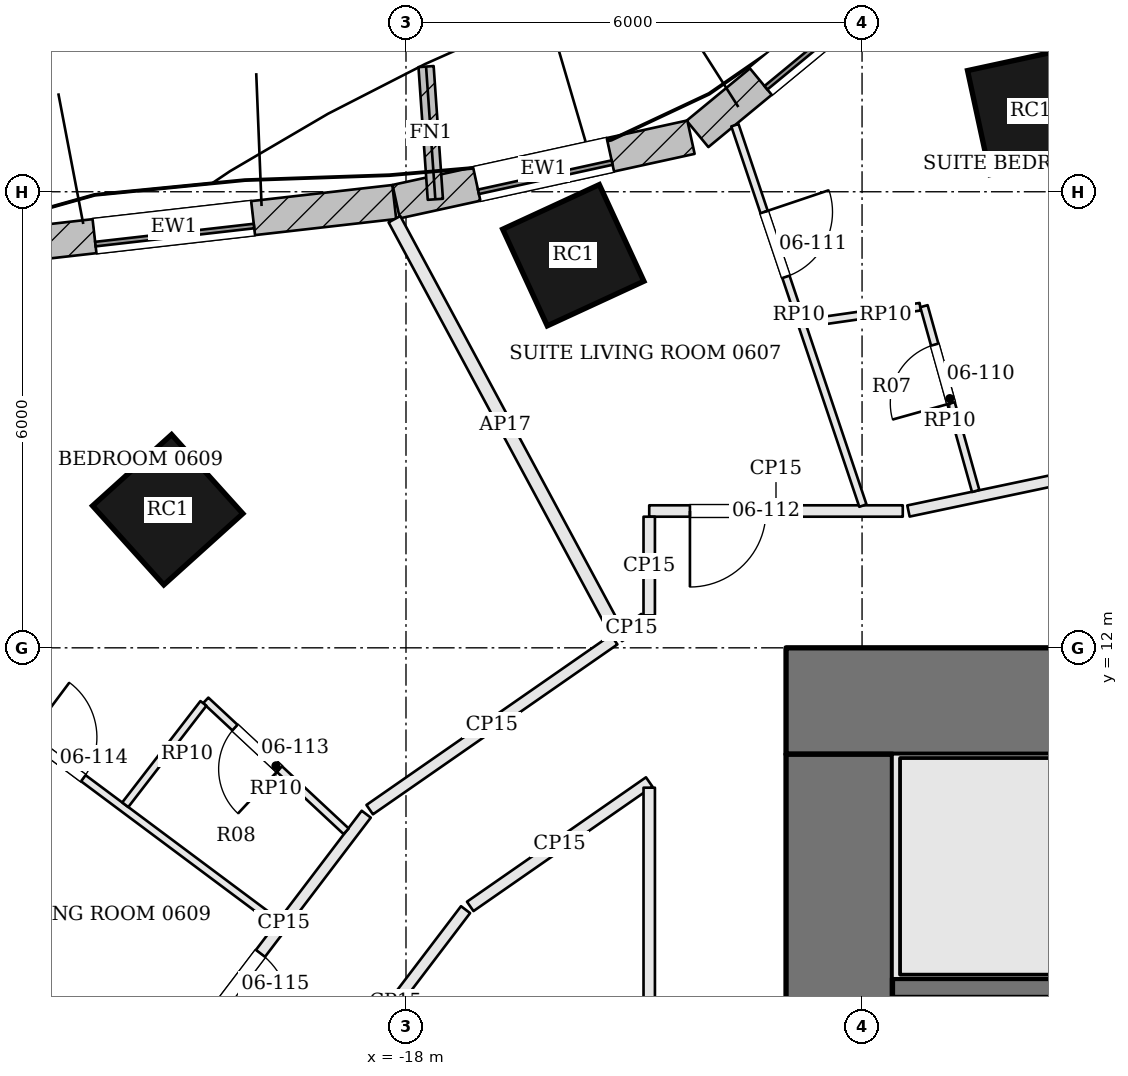
"""IFC4 building model, lengths in metres.
Left out: names, types, materials, properties, quantities, classifications, styles, units other than length and angle.
Written with IfcOpenShell. Run it as: python <this file> out.ifc"""

import sys

from ifc_helpers import new_model, si_unit, direction, frame, frame_2d, origin, origin_2d, place, context, subcontext, project, spatial, rectangle, extrude, element, fill, save


model = new_model("IFC4")
c1 = context("Model", 3, precision=1e-05, world=origin(), true_north=direction((0.0, 1.0)))
c2 = subcontext(c1, "Body", "Model", "MODEL_VIEW")
j1 = project(units=[si_unit("LENGTHUNIT", "METRE"), si_unit("PLANEANGLEUNIT", "RADIAN")], contexts=[c1])
p1 = place(None, origin())
s1 = spatial("IfcSite", under=j1, at=p1, CompositionType="ELEMENT")
p2 = place(p1, origin())
s2 = spatial("IfcBuilding", under=s1, at=p2, CompositionType="ELEMENT")
p3 = place(p2, frame((0.0, 0.0, 37.5)))
s3 = spatial("IfcBuildingStorey", under=s2, at=p3, CompositionType="ELEMENT", Elevation=37.5)
p4 = place(p3, frame((-13.0, 11.3, 0.0), z_axis=(0.0, 0.0, 1.0), x_axis=(1.0, 0.0, 0.0)))
e1 = element("IfcWall", 1, at=p4, inside=s3, PredefinedType="SHEAR", context=c2, shape_type="SweptSolid", body=[
    extrude(rectangle(XDim=26.0, YDim=1.4, at=frame_2d((13.0, 0.0))), origin(), (0.0, 0.0, 1.0), 3.6),
])
p5 = place(p4, frame((9.225, 0.0, 0.0)))
e2 = element("IfcOpeningElement", 2, at=p5, cuts=e1, PredefinedType="OPENING", context=c2, shape_type="SweptSolid", body=[
    extrude(rectangle(XDim=1.0, YDim=2.1, at=frame_2d((0.5, 1.05))), frame((0.0, 0.71, 0.0), z_axis=(0.0, -1.0, 0.0), x_axis=(1.0, 0.0, 0.0)), (0.0, 0.0, 1.0), 1.42),
])
p6 = place(p4, frame((11.825, 0.0, 0.0)))
e3 = element("IfcOpeningElement", 3, at=p6, cuts=e1, PredefinedType="OPENING", context=c2, shape_type="SweptSolid", body=[
    extrude(rectangle(XDim=0.7, YDim=2.1, at=frame_2d((0.35, 1.05))), frame((0.0, 0.71, 0.0), z_axis=(0.0, -1.0, 0.0), x_axis=(1.0, 0.0, 0.0)), (0.0, 0.0, 1.0), 1.42),
])
p7 = place(p4, frame((13.725, 0.0, 0.0)))
e4 = element("IfcOpeningElement", 4, at=p7, cuts=e1, PredefinedType="OPENING", context=c2, shape_type="SweptSolid", body=[
    extrude(rectangle(XDim=1.0, YDim=2.1, at=frame_2d((0.5, 1.05))), frame((0.0, 0.71, 0.0), z_axis=(0.0, -1.0, 0.0), x_axis=(1.0, 0.0, 0.0)), (0.0, 0.0, 1.0), 1.42),
])
p8 = place(p4, frame((16.225, 0.0, 0.0)))
e5 = element("IfcOpeningElement", 5, at=p8, cuts=e1, PredefinedType="OPENING", context=c2, shape_type="SweptSolid", body=[
    extrude(rectangle(XDim=0.9, YDim=2.1, at=frame_2d((0.45, 1.05))), frame((0.0, 0.71, 0.0), z_axis=(0.0, -1.0, 0.0), x_axis=(1.0, 0.0, 0.0)), (0.0, 0.0, 1.0), 1.42),
])
p9 = place(p3, frame((-12.3, -1.6, 0.0), z_axis=(0.0, 0.0, 1.0), x_axis=(0.0, 1.0, 0.0)))
e6 = element("IfcWall", 6, at=p9, inside=s3, PredefinedType="SHEAR", context=c2, shape_type="SweptSolid", body=[
    extrude(rectangle(XDim=12.2, YDim=1.4, at=frame_2d((6.1, 0.0))), origin(), (0.0, 0.0, 1.0), 3.6),
])
p10 = place(p9, frame((3.6, 0.0, 0.0)))
e7 = element("IfcOpeningElement", 7, at=p10, cuts=e6, PredefinedType="OPENING", context=c2, shape_type="SweptSolid", body=[
    extrude(rectangle(XDim=1.8, YDim=2.1, at=frame_2d((0.9, 1.05))), frame((0.0, 0.71, 0.0), z_axis=(0.0, -1.0, 0.0), x_axis=(1.0, 0.0, 0.0)), (0.0, 0.0, 1.0), 1.42),
])
for number, where, z_axis, x_axis in (
    (8, (-9.78, 19.058, 0.0), (0.0, 0.0, 1.0), (-0.977, -0.211, 0.0)),
    (9, (-15.799, 17.165, 0.0), (0.0, 0.0, 1.0), (-0.908, -0.419, 0.0)),
    (10, (-21.135, 13.817, 0.0), (0.0, 0.0, 1.0), (-0.743, -0.67, 0.0)),
):
    element("IfcColumn", number, at=place(p3, frame(where, z_axis=z_axis, x_axis=x_axis)), inside=s3, PredefinedType="COLUMN", context=c2, shape_type="SweptSolid", body=[
        extrude(rectangle(XDim=1.4, YDim=1.4, at=origin_2d()), origin(), (0.0, 0.0, 1.0), 3.6),
    ])
p11 = place(p3, frame((-10.879, 21.473, 0.0), z_axis=(0.0, 0.0, 1.0), x_axis=(-0.77124668946, -0.636536365023, 0.0)))
e11 = element("IfcWall", 11, at=p11, inside=s3, PredefinedType="SOLIDWALL", context=c2, shape_type="SweptSolid", body=[
    extrude(rectangle(XDim=4.261, YDim=0.45, at=frame_2d((2.13, 0.0))), origin(), (0.0, 0.0, 1.0), 3.4),
])
p12 = place(p11, frame((1.08, 0.0, 0.9)))
e12 = element("IfcOpeningElement", 12, at=p12, cuts=e11, PredefinedType="OPENING", context=c2, shape_type="SweptSolid", body=[
    extrude(rectangle(XDim=2.1, YDim=2.0, at=frame_2d((1.05, 1.0))), frame((0.0, 0.235, 0.0), z_axis=(0.0, -1.0, 0.0), x_axis=(1.0, 0.0, 0.0)), (0.0, 0.0, 1.0), 0.47),
])
p13 = place(p3, frame((-14.251, 18.718, 0.0), z_axis=(0.0, 0.0, 1.0), x_axis=(-0.976903627618, -0.213680374267, 0.0)))
e13 = element("IfcWall", 13, at=p13, inside=s3, PredefinedType="SOLIDWALL", context=c2, shape_type="SweptSolid", body=[
    extrude(rectangle(XDim=3.97, YDim=0.45, at=frame_2d((1.985, 0.0))), origin(), (0.0, 0.0, 1.0), 3.4),
])
p14 = place(p13, frame((1.085, 0.0, 0.9)))
e14 = element("IfcOpeningElement", 14, at=p14, cuts=e13, PredefinedType="OPENING", context=c2, shape_type="SweptSolid", body=[
    extrude(rectangle(XDim=1.8, YDim=2.0, at=frame_2d((0.9, 1.0))), frame((0.0, 0.235, 0.0), z_axis=(0.0, -1.0, 0.0), x_axis=(1.0, 0.0, 0.0)), (0.0, 0.0, 1.0), 0.47),
])
p15 = place(p3, frame((-18.154, 17.865, 0.0), z_axis=(0.0, 0.0, 1.0), x_axis=(-0.993572909097, -0.113193967633, 0.0)))
e15 = element("IfcWall", 15, at=p15, inside=s3, PredefinedType="SOLIDWALL", context=c2, shape_type="SweptSolid", body=[
    extrude(rectangle(XDim=5.839, YDim=0.45, at=frame_2d((2.919, 0.0))), origin(), (0.0, 0.0, 1.0), 3.4),
])
p16 = place(p15, frame((1.869, 0.0, 0.9)))
e16 = element("IfcOpeningElement", 16, at=p16, cuts=e15, PredefinedType="OPENING", context=c2, shape_type="SweptSolid", body=[
    extrude(rectangle(XDim=2.1, YDim=2.0, at=frame_2d((1.05, 1.0))), frame((0.0, 0.235, 0.0), z_axis=(0.0, -1.0, 0.0), x_axis=(1.0, 0.0, 0.0)), (0.0, 0.0, 1.0), 0.47),
])
p17 = place(p3, frame((-17.614, 17.901, 0.0), z_axis=(0.0, 0.0, 1.0), x_axis=(-0.069750000204, 0.997564502913, 0.0)))
e17 = element("IfcWall", 17, at=p17, inside=s3, PredefinedType="SOLIDWALL", context=c2, shape_type="SweptSolid", body=[
    extrude(rectangle(XDim=1.75, YDim=0.2, at=frame_2d((0.875, 0.0))), origin(), (0.0, 0.0, 1.0), 3.4),
])
p18 = place(p3, frame((-11.6, 7.525, 0.0), z_axis=(0.0, 0.0, 1.0), x_axis=(1.0, 0.0, 0.0)))
e18 = element("IfcWall", 18, at=p18, inside=s3, PredefinedType="SOLIDWALL", context=c2, shape_type="SweptSolid", body=[
    extrude(rectangle(XDim=6.5, YDim=0.25, at=frame_2d((3.25, 0.0))), origin(), (0.0, 0.0, 1.0), 3.4),
])
p19 = place(p18, frame((5.2, 0.0, 0.0)))
e19 = element("IfcOpeningElement", 19, at=p19, cuts=e18, PredefinedType="OPENING", context=c2, shape_type="SweptSolid", body=[
    extrude(rectangle(XDim=1.2, YDim=2.1, at=frame_2d((0.6, 1.05))), frame((0.0, 0.135, 0.0), z_axis=(0.0, -1.0, 0.0), x_axis=(1.0, 0.0, 0.0)), (0.0, 0.0, 1.0), 0.27),
])
p20 = place(p3, frame((-6.55, 14.821, 0.0), z_axis=(0.0, 0.0, 1.0), x_axis=(-0.978464864562, -0.206413441465, 0.0)))
e20 = element("IfcWall", 20, at=p20, inside=s3, PredefinedType="PARTITIONING", context=c2, shape_type="SweptSolid", body=[
    extrude(rectangle(XDim=4.946, YDim=0.15, at=frame_2d((2.473, 0.0))), origin(), (0.0, 0.0, 1.0), 2.68),
])
p21 = place(p3, frame((-11.464, 13.8, 0.0), z_axis=(0.0, 0.0, 1.0), x_axis=(-1.0, 0.0, 0.0)))
e21 = element("IfcWall", 21, at=p21, inside=s3, PredefinedType="PARTITIONING", context=c2, shape_type="SweptSolid", body=[
    extrude(rectangle(XDim=3.336, YDim=0.15, at=frame_2d((1.668, 0.0))), origin(), (0.0, 0.0, 1.0), 2.68),
])
p22 = place(p21, frame((1.8, 0.0, 0.0)))
e22 = element("IfcOpeningElement", 22, at=p22, cuts=e21, PredefinedType="OPENING", context=c2, shape_type="SweptSolid", body=[
    extrude(rectangle(XDim=1.0, YDim=2.1, at=frame_2d((0.5, 1.05))), frame((0.0, 0.085, 0.0), z_axis=(0.0, -1.0, 0.0), x_axis=(1.0, 0.0, 0.0)), (0.0, 0.0, 1.0), 0.17),
])
p23 = place(p3, frame((-14.8, 13.725, 0.0), z_axis=(0.0, 0.0, 1.0), x_axis=(-0.000188040613, -0.99999998232, 0.0)))
e23 = element("IfcWall", 23, at=p23, inside=s3, PredefinedType="PARTITIONING", context=c2, shape_type="SweptSolid", body=[
    extrude(rectangle(XDim=1.298, YDim=0.15, at=frame_2d((0.649, 0.0))), origin(), (0.0, 0.0, 1.0), 2.68),
])
p24 = place(p3, frame((-14.862, 12.384, 0.0), z_axis=(0.0, 0.0, 1.0), x_axis=(-0.821122810289, -0.57075154877, 0.0)))
e24 = element("IfcWall", 24, at=p24, inside=s3, PredefinedType="PARTITIONING", context=c2, shape_type="SweptSolid", body=[
    extrude(rectangle(XDim=0.411, YDim=0.15, at=frame_2d((0.206, 0.0))), origin(), (0.0, 0.0, 1.0), 2.68),
])
p25 = place(p3, frame((-18.152, 17.639, 0.0), z_axis=(0.0, 0.0, 1.0), x_axis=(0.473671861607, -0.880701406563, 0.0)))
e25 = element("IfcWall", 25, at=p25, inside=s3, PredefinedType="PARTITIONING", context=c2, shape_type="SweptSolid", body=[
    extrude(rectangle(XDim=6.158, YDim=0.175, at=frame_2d((3.079, 0.0))), origin(), (0.0, 0.0, 1.0), 2.68),
])
p26 = place(p3, frame((-15.261, 12.106, 0.0), z_axis=(0.0, 0.0, 1.0), x_axis=(-0.821154131814, -0.57070648481, 0.0)))
e26 = element("IfcWall", 26, at=p26, inside=s3, PredefinedType="PARTITIONING", context=c2, shape_type="SweptSolid", body=[
    extrude(rectangle(XDim=3.917, YDim=0.15, at=frame_2d((1.958, 0.0))), origin(), (0.0, 0.0, 1.0), 2.68),
])
p27 = place(p3, frame((-18.523, 9.811, 0.0), z_axis=(0.0, 0.0, 1.0), x_axis=(-0.605040130963, -0.796194976073, 0.0)))
e27 = element("IfcWall", 27, at=p27, inside=s3, PredefinedType="PARTITIONING", context=c2, shape_type="SweptSolid", body=[
    extrude(rectangle(XDim=3.588, YDim=0.15, at=frame_2d((1.794, 0.0))), origin(), (0.0, 0.0, 1.0), 2.68),
])
p28 = place(p27, frame((2.3, 0.0, 0.0)))
e28 = element("IfcOpeningElement", 28, at=p28, cuts=e27, PredefinedType="OPENING", context=c2, shape_type="SweptSolid", body=[
    extrude(rectangle(XDim=1.0, YDim=2.1, at=frame_2d((0.5, 1.05))), frame((0.0, 0.085, 0.0), z_axis=(0.0, -1.0, 0.0), x_axis=(1.0, 0.0, 0.0)), (0.0, 0.0, 1.0), 0.17),
])
p29 = place(p3, frame((-27.056, 8.96, 0.0), z_axis=(0.0, 0.0, 1.0), x_axis=(0.91014850699, -0.414282144466, 0.0)))
e29 = element("IfcWall", 29, at=p29, inside=s3, PredefinedType="PARTITIONING", context=c2, shape_type="SweptSolid", body=[
    extrude(rectangle(XDim=6.602, YDim=0.175, at=frame_2d((3.301, 0.0))), origin(), (0.0, 0.0, 1.0), 2.68),
])
p30 = place(p3, frame((-19.056, 6.135, 0.0), z_axis=(0.0, 0.0, 1.0), x_axis=(0.604999774258, 0.796225642107, 0.0)))
e30 = element("IfcWall", 30, at=p30, inside=s3, PredefinedType="PARTITIONING", context=c2, shape_type="SweptSolid", body=[
    extrude(rectangle(XDim=3.04, YDim=0.15, at=frame_2d((1.52, 0.0))), origin(), (0.0, 0.0, 1.0), 2.68),
])
p31 = place(p3, frame((-17.155, 8.598, 0.0), z_axis=(0.0, 0.0, 1.0), x_axis=(0.821087350938, 0.570802559673, 0.0)))
e31 = element("IfcWall", 31, at=p31, inside=s3, PredefinedType="PARTITIONING", context=c2, shape_type="SweptSolid", body=[
    extrude(rectangle(XDim=2.868, YDim=0.15, at=frame_2d((1.434, 0.0))), origin(), (0.0, 0.0, 1.0), 2.68),
])
p32 = place(p3, frame((-14.8, 10.16, 0.0), z_axis=(0.0, 0.0, 1.0), x_axis=(0.0, -1.0, 0.0)))
e32 = element("IfcWall", 32, at=p32, inside=s3, PredefinedType="PARTITIONING", context=c2, shape_type="SweptSolid", body=[
    extrude(rectangle(XDim=14.96, YDim=0.15, at=frame_2d((7.48, 0.0))), origin(), (0.0, 0.0, 1.0), 2.68),
])
p33 = place(p32, frame((6.542, 0.0, 0.0)))
e33 = element("IfcOpeningElement", 33, at=p33, cuts=e32, PredefinedType="OPENING", context=c2, shape_type="SweptSolid", body=[
    extrude(rectangle(XDim=1.8, YDim=2.1, at=frame_2d((0.9, 1.05))), frame((0.0, 0.085, 0.0), z_axis=(0.0, -1.0, 0.0), x_axis=(1.0, 0.0, 0.0)), (0.0, 0.0, 1.0), 0.17),
])
p34 = place(p3, frame((-13.673, 18.876, 0.0), z_axis=(0.0, 0.0, 1.0), x_axis=(0.318889713753, -0.947791828654, 0.0)))
e34 = element("IfcWall", 34, at=p34, inside=s3, PredefinedType="PARTITIONING", context=c2, shape_type="SweptSolid", body=[
    extrude(rectangle(XDim=5.28, YDim=0.1, at=frame_2d((2.64, 0.0))), origin(), (0.0, 0.0, 1.0), 2.884),
])
p35 = place(p34, frame((1.205, 0.0, 0.0)))
e35 = element("IfcOpeningElement", 35, at=p35, cuts=e34, PredefinedType="OPENING", context=c2, shape_type="SweptSolid", body=[
    extrude(rectangle(XDim=0.9, YDim=2.4, at=frame_2d((0.45, 1.2))), frame((0.0, 0.06, 0.0), z_axis=(0.0, -1.0, 0.0), x_axis=(1.0, 0.0, 0.0)), (0.0, 0.0, 1.0), 0.12),
])
p36 = place(p3, frame((-10.505, 14.063, 0.0), z_axis=(0.0, 0.0, 1.0), x_axis=(-0.269378866163, 0.963034281043, 0.0)))
e36 = element("IfcWall", 36, at=p36, inside=s3, PredefinedType="PARTITIONING", context=c2, shape_type="SweptSolid", body=[
    extrude(rectangle(XDim=2.525, YDim=0.1, at=frame_2d((1.262, 0.0))), origin(), (0.0, 0.0, 1.0), 2.884),
])
p37 = place(p36, frame((1.2, 0.0, 0.0)))
e37 = element("IfcOpeningElement", 37, at=p37, cuts=e36, PredefinedType="OPENING", context=c2, shape_type="SweptSolid", body=[
    extrude(rectangle(XDim=0.8, YDim=2.1, at=frame_2d((0.4, 1.05))), frame((0.0, 0.06, 0.0), z_axis=(0.0, -1.0, 0.0), x_axis=(1.0, 0.0, 0.0)), (0.0, 0.0, 1.0), 0.12),
])
p38 = place(p3, frame((-11.235, 16.488, 0.0), z_axis=(0.0, 0.0, 1.0), x_axis=(-0.989914246095, -0.141667869954, 0.0)))
e38 = element("IfcWall", 38, at=p38, inside=s3, PredefinedType="PARTITIONING", context=c2, shape_type="SweptSolid", body=[
    extrude(rectangle(XDim=1.525, YDim=0.1, at=frame_2d((0.763, 0.0))), origin(), (0.0, 0.0, 1.0), 2.884),
])
p39 = place(p3, frame((-26.844, 13.716, 0.0), z_axis=(0.0, 0.0, 1.0), x_axis=(0.801519329803, -0.59796886537, 0.0)))
e39 = element("IfcWall", 39, at=p39, inside=s3, PredefinedType="PARTITIONING", context=c2, shape_type="SweptSolid", body=[
    extrude(rectangle(XDim=8.913, YDim=0.1, at=frame_2d((4.457, 0.0))), origin(), (0.0, 0.0, 1.0), 2.884),
])
p40 = place(p39, frame((4.838, 0.0, 0.0)))
e40 = element("IfcOpeningElement", 40, at=p40, cuts=e39, PredefinedType="OPENING", context=c2, shape_type="SweptSolid", body=[
    extrude(rectangle(XDim=0.9, YDim=2.4, at=frame_2d((0.45, 1.2))), frame((0.0, 0.06, 0.0), z_axis=(0.0, -1.0, 0.0), x_axis=(1.0, 0.0, 0.0)), (0.0, 0.0, 1.0), 0.12),
])
p41 = place(p3, frame((-18.787, 9.587, 0.0), z_axis=(0.0, 0.0, 1.0), x_axis=(-0.731473133424, 0.681870262645, 0.0)))
e41 = element("IfcWall", 41, at=p41, inside=s3, PredefinedType="PARTITIONING", context=c2, shape_type="SweptSolid", body=[
    extrude(rectangle(XDim=2.525, YDim=0.1, at=frame_2d((1.262, 0.0))), origin(), (0.0, 0.0, 1.0), 2.884),
])
p42 = place(p41, frame((1.2, 0.0, 0.0)))
e42 = element("IfcOpeningElement", 42, at=p42, cuts=e41, PredefinedType="OPENING", context=c2, shape_type="SweptSolid", body=[
    extrude(rectangle(XDim=0.8, YDim=2.1, at=frame_2d((0.4, 1.05))), frame((0.0, 0.06, 0.0), z_axis=(0.0, -1.0, 0.0), x_axis=(1.0, 0.0, 0.0)), (0.0, 0.0, 1.0), 0.12),
])
p43 = place(p3, frame((-20.665, 11.269, 0.0), z_axis=(0.0, 0.0, 1.0), x_axis=(-0.610915108386, -0.791696109847, 0.0)))
e43 = element("IfcWall", 43, at=p43, inside=s3, PredefinedType="PARTITIONING", context=c2, shape_type="SweptSolid", body=[
    extrude(rectangle(XDim=1.684, YDim=0.1, at=frame_2d((0.842, 0.0))), origin(), (0.0, 0.0, 1.0), 2.884),
])
p44 = place(p12, origin())
e44 = element("IfcWindow", 44, at=p44, inside=s3, PartitioningType="SINGLE_PANEL", PredefinedType="WINDOW", context=c2, shape_type="SweptSolid", body=[
    extrude(rectangle(XDim=2.1, YDim=2.0, at=frame_2d((1.05, 1.0))), frame((0.0, 0.135, 0.0), z_axis=(0.0, -1.0, 0.0), x_axis=(1.0, 0.0, 0.0)), (0.0, 0.0, 1.0), 0.06),
])
fill(e12, e44)
p45 = place(p14, origin())
e45 = element("IfcWindow", 45, at=p45, inside=s3, PartitioningType="SINGLE_PANEL", PredefinedType="WINDOW", context=c2, shape_type="SweptSolid", body=[
    extrude(rectangle(XDim=1.8, YDim=2.0, at=frame_2d((0.9, 1.0))), frame((0.0, 0.135, 0.0), z_axis=(0.0, -1.0, 0.0), x_axis=(1.0, 0.0, 0.0)), (0.0, 0.0, 1.0), 0.06),
])
fill(e14, e45)
p46 = place(p16, origin())
e46 = element("IfcWindow", 46, at=p46, inside=s3, PartitioningType="SINGLE_PANEL", PredefinedType="WINDOW", context=c2, shape_type="SweptSolid", body=[
    extrude(rectangle(XDim=2.1, YDim=2.0, at=frame_2d((1.05, 1.0))), frame((0.0, 0.135, 0.0), z_axis=(0.0, -1.0, 0.0), x_axis=(1.0, 0.0, 0.0)), (0.0, 0.0, 1.0), 0.06),
])
fill(e16, e46)
p47 = place(p37, origin())
e47 = element("IfcDoor", 47, at=p47, inside=s3, OperationType="SINGLE_SWING_LEFT", PredefinedType="DOOR", context=c2, shape_type="SweptSolid", body=[
    extrude(rectangle(XDim=0.8, YDim=2.1, at=frame_2d((0.4, 1.05))), frame((0.0, 0.025, 0.0), z_axis=(0.0, -1.0, 0.0), x_axis=(1.0, 0.0, 0.0)), (0.0, 0.0, 1.0), 0.05),
])
fill(e37, e47)
p48 = place(p35, origin())
e48 = element("IfcDoor", 48, at=p48, inside=s3, OperationType="SINGLE_SWING_LEFT", PredefinedType="DOOR", context=c2, shape_type="SweptSolid", body=[
    extrude(rectangle(XDim=0.9, YDim=2.4, at=frame_2d((0.45, 1.2))), frame((0.0, 0.025, 0.0), z_axis=(0.0, -1.0, 0.0), x_axis=(1.0, 0.0, 0.0)), (0.0, 0.0, 1.0), 0.05),
])
fill(e35, e48)
p49 = place(p22, origin())
e49 = element("IfcDoor", 49, at=p49, inside=s3, OperationType="SINGLE_SWING_RIGHT", PredefinedType="DOOR", context=c2, shape_type="SweptSolid", body=[
    extrude(rectangle(XDim=1.0, YDim=2.1, at=frame_2d((0.5, 1.05))), frame((0.0, 0.025, 0.0), z_axis=(0.0, -1.0, 0.0), x_axis=(1.0, 0.0, 0.0)), (0.0, 0.0, 1.0), 0.05),
])
fill(e22, e49)
p50 = place(p42, origin())
e50 = element("IfcDoor", 50, at=p50, inside=s3, OperationType="SINGLE_SWING_LEFT", PredefinedType="DOOR", context=c2, shape_type="SweptSolid", body=[
    extrude(rectangle(XDim=0.8, YDim=2.1, at=frame_2d((0.4, 1.05))), frame((0.0, 0.025, 0.0), z_axis=(0.0, -1.0, 0.0), x_axis=(1.0, 0.0, 0.0)), (0.0, 0.0, 1.0), 0.05),
])
fill(e42, e50)
p51 = place(p40, origin())
e51 = element("IfcDoor", 51, at=p51, inside=s3, OperationType="SINGLE_SWING_LEFT", PredefinedType="DOOR", context=c2, shape_type="SweptSolid", body=[
    extrude(rectangle(XDim=0.9, YDim=2.4, at=frame_2d((0.45, 1.2))), frame((0.0, 0.025, 0.0), z_axis=(0.0, -1.0, 0.0), x_axis=(1.0, 0.0, 0.0)), (0.0, 0.0, 1.0), 0.05),
])
fill(e40, e51)
p52 = place(p28, origin())
e52 = element("IfcDoor", 52, at=p52, inside=s3, OperationType="SINGLE_SWING_RIGHT", PredefinedType="DOOR", context=c2, shape_type="SweptSolid", body=[
    extrude(rectangle(XDim=1.0, YDim=2.1, at=frame_2d((0.5, 1.05))), frame((0.0, 0.025, 0.0), z_axis=(0.0, -1.0, 0.0), x_axis=(1.0, 0.0, 0.0)), (0.0, 0.0, 1.0), 0.05),
])
fill(e28, e52)
save(model, sys.argv[1])
